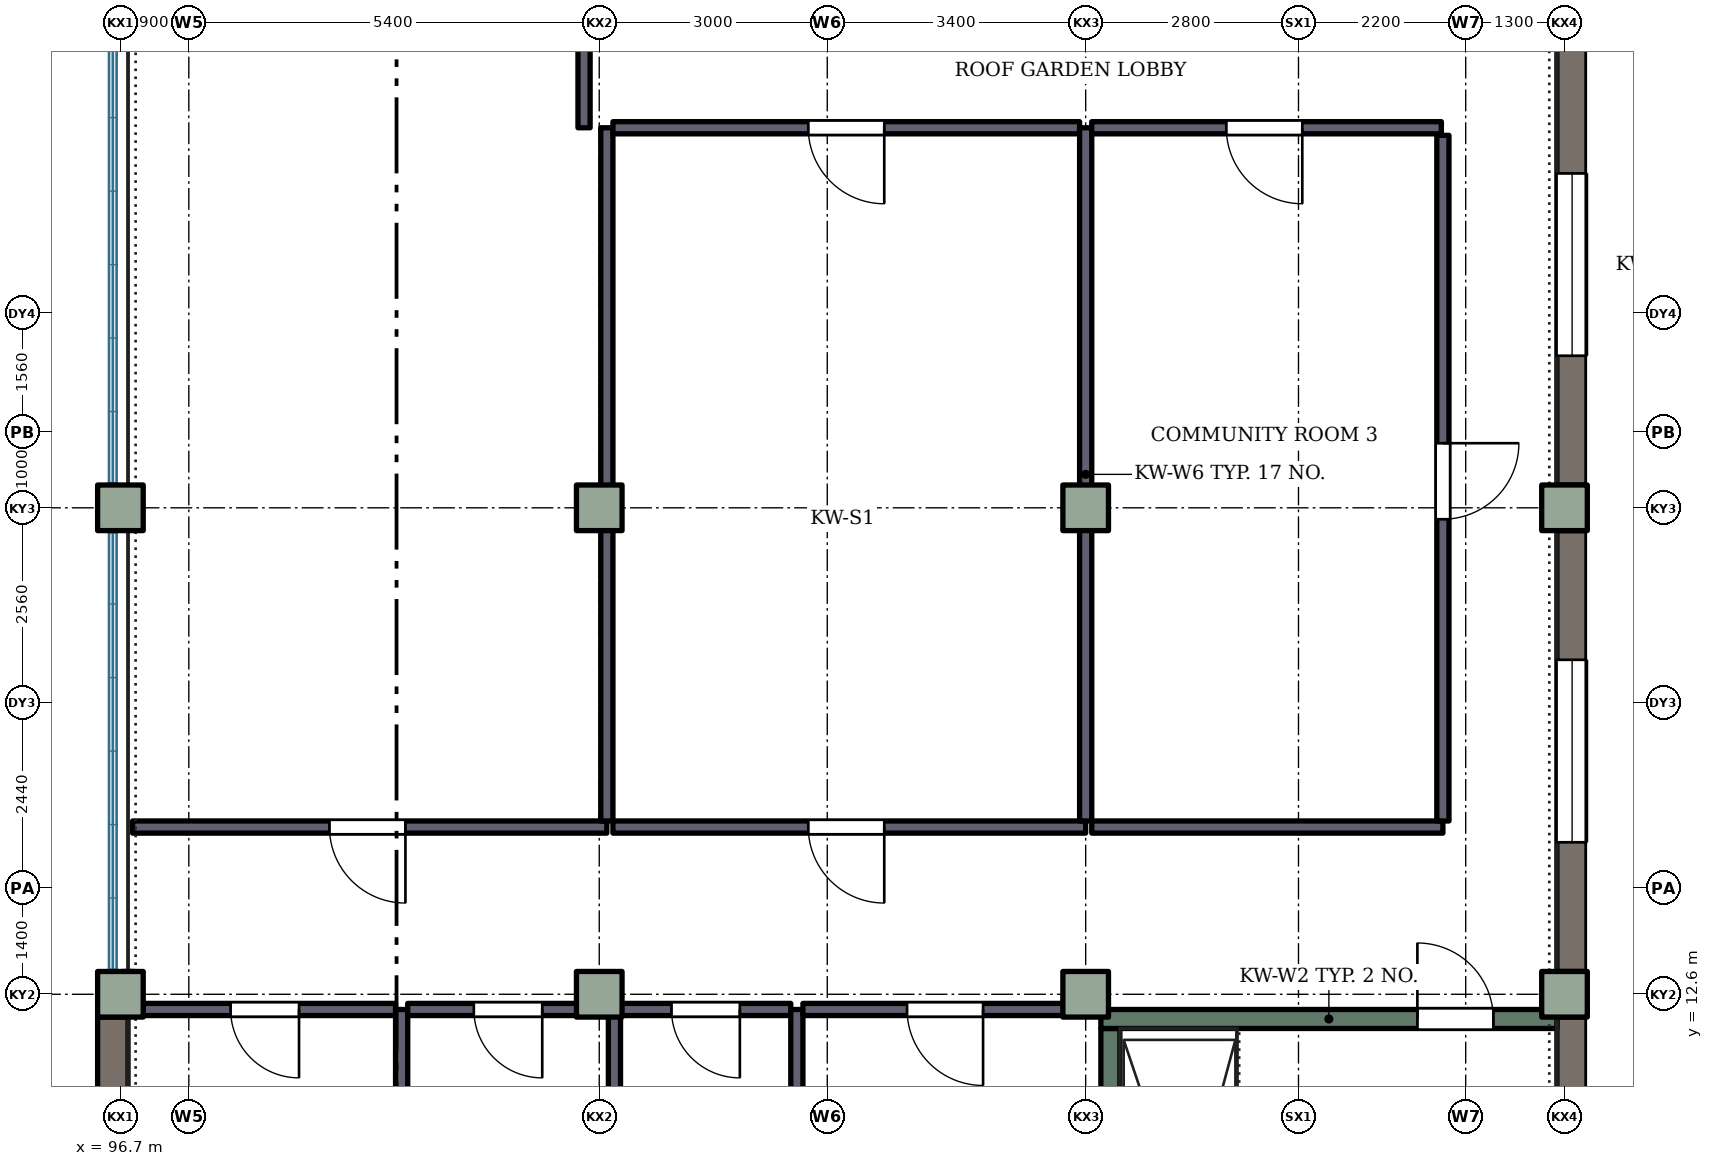
"""IFC4 building model, lengths in metres.
Left out: names, types, materials, properties, quantities, classifications, styles, units other than length and angle.
Written with IfcOpenShell. Run it as: python <this file> out.ifc"""

import sys

from ifc_helpers import new_model, si_unit, direction, frame, frame_2d, origin, origin_2d, place, context, subcontext, project, spatial, rectangle, extrude, element, fill, save


model = new_model("IFC4")
c1 = context("Model", 3, precision=1e-05, world=origin(), true_north=direction((0.0, 1.0)))
c2 = subcontext(c1, "Body", "Model", "MODEL_VIEW")
j1 = project(units=[si_unit("LENGTHUNIT", "METRE"), si_unit("PLANEANGLEUNIT", "RADIAN")], contexts=[c1])
p1 = place(None, origin())
s1 = spatial("IfcSite", under=j1, at=p1, CompositionType="ELEMENT")
p2 = place(p1, origin())
s2 = spatial("IfcBuilding", under=s1, at=p2, CompositionType="ELEMENT")
p3 = place(p2, frame((0.0, 0.0, 8.4)))
s3 = spatial("IfcBuildingStorey", under=s2, at=p3, CompositionType="ELEMENT", Elevation=8.4)
for number, where, z_axis, x_axis in (
    (1, (96.7, 12.6, 0.0), (0.0, 0.0, 1.0), (1.0, 0.0, 0.0)),
    (2, (96.7, 19.0, 0.0), (0.0, 0.0, 1.0), (1.0, 0.0, 0.0)),
    (3, (103.0, 12.6, 0.0), (0.0, 0.0, 1.0), (1.0, 0.0, 0.0)),
    (4, (103.0, 19.0, 0.0), (0.0, 0.0, 1.0), (1.0, 0.0, 0.0)),
    (5, (109.4, 12.6, 0.0), (0.0, 0.0, 1.0), (1.0, 0.0, 0.0)),
    (6, (109.4, 19.0, 0.0), (0.0, 0.0, 1.0), (1.0, 0.0, 0.0)),
    (7, (115.7, 12.6, 0.0), (0.0, 0.0, 1.0), (1.0, 0.0, 0.0)),
    (8, (115.7, 19.0, 0.0), (0.0, 0.0, 1.0), (1.0, 0.0, 0.0)),
):
    element("IfcColumn", number, at=place(p3, frame(where, z_axis=z_axis, x_axis=x_axis)), inside=s3, PredefinedType="COLUMN", context=c2, shape_type="SweptSolid", body=[
        extrude(rectangle(XDim=0.6, YDim=0.6, at=origin_2d()), origin(), (0.0, 0.0, 1.0), 4.2),
    ])
p4 = place(p3, frame((96.6, 6.6, 0.0), z_axis=(0.0, 0.0, 1.0), x_axis=(0.0, 1.0, 0.0)))
e9 = element("IfcWall", 9, at=p4, inside=s3, PredefinedType="SOLIDWALL", context=c2, shape_type="SweptSolid", body=[
    extrude(rectangle(XDim=5.7, YDim=0.4, at=frame_2d((2.85, 0.0))), origin(), (0.0, 0.0, 1.0), 4.2),
])
p5 = place(p3, frame((115.8, 12.3, 0.0), z_axis=(0.0, 0.0, 1.0), x_axis=(0.0, -1.0, 0.0)))
e10 = element("IfcWall", 10, at=p5, inside=s3, PredefinedType="SOLIDWALL", context=c2, shape_type="SweptSolid", body=[
    extrude(rectangle(XDim=5.7, YDim=0.4, at=frame_2d((2.85, 0.0))), origin(), (0.0, 0.0, 1.0), 4.2),
])
p6 = place(p5, frame((2.35, 0.0, 0.9)))
e11 = element("IfcOpeningElement", 11, at=p6, cuts=e10, PredefinedType="OPENING", context=c2, shape_type="SweptSolid", body=[
    extrude(rectangle(XDim=1.0, YDim=1.5, at=frame_2d((0.5, 0.75))), frame((0.0, 0.21, 0.0), z_axis=(0.0, -1.0, 0.0), x_axis=(1.0, 0.0, 0.0)), (0.0, 0.0, 1.0), 0.42),
])
p7 = place(p3, frame((115.8, 18.7, 0.0), z_axis=(0.0, 0.0, 1.0), x_axis=(0.0, -1.0, 0.0)))
e12 = element("IfcWall", 12, at=p7, inside=s3, PredefinedType="SOLIDWALL", context=c2, shape_type="SweptSolid", body=[
    extrude(rectangle(XDim=5.8, YDim=0.4, at=frame_2d((2.9, 0.0))), origin(), (0.0, 0.0, 1.0), 4.2),
])
p8 = place(p7, frame((1.7, 0.0, 0.9)))
e13 = element("IfcOpeningElement", 13, at=p8, cuts=e12, PredefinedType="OPENING", context=c2, shape_type="SweptSolid", body=[
    extrude(rectangle(XDim=2.4, YDim=2.7, at=frame_2d((1.2, 1.35))), frame((0.0, 0.21, 0.0), z_axis=(0.0, -1.0, 0.0), x_axis=(1.0, 0.0, 0.0)), (0.0, 0.0, 1.0), 0.42),
])
p9 = place(p3, frame((115.8, 25.1, 0.0), z_axis=(0.0, 0.0, 1.0), x_axis=(0.0, -1.0, 0.0)))
e14 = element("IfcWall", 14, at=p9, inside=s3, PredefinedType="SOLIDWALL", context=c2, shape_type="SweptSolid", body=[
    extrude(rectangle(XDim=5.8, YDim=0.4, at=frame_2d((2.9, 0.0))), origin(), (0.0, 0.0, 1.0), 4.2),
])
p10 = place(p9, frame((1.7, 0.0, 0.9)))
e15 = element("IfcOpeningElement", 15, at=p10, cuts=e14, PredefinedType="OPENING", context=c2, shape_type="SweptSolid", body=[
    extrude(rectangle(XDim=2.4, YDim=2.7, at=frame_2d((1.2, 1.35))), frame((0.0, 0.21, 0.0), z_axis=(0.0, -1.0, 0.0), x_axis=(1.0, 0.0, 0.0)), (0.0, 0.0, 1.0), 0.42),
])
p11 = place(p3, frame((109.725, 6.4, 0.0), z_axis=(0.0, 0.0, 1.0), x_axis=(0.0, 1.0, 0.0)))
e16 = element("IfcWall", 16, at=p11, inside=s3, PredefinedType="SHEAR", context=c2, shape_type="SweptSolid", body=[
    extrude(rectangle(XDim=5.75, YDim=0.25, at=frame_2d((2.875, 0.0))), origin(), (0.0, 0.0, 1.0), 4.2),
])
p12 = place(p3, frame((109.6, 12.275, 0.0), z_axis=(0.0, 0.0, 1.0), x_axis=(1.0, 0.0, 0.0)))
e17 = element("IfcWall", 17, at=p12, inside=s3, PredefinedType="SHEAR", context=c2, shape_type="SweptSolid", body=[
    extrude(rectangle(XDim=6.0, YDim=0.25, at=frame_2d((3.0, 0.0))), origin(), (0.0, 0.0, 1.0), 4.2),
])
p13 = place(p12, frame((4.164, 0.0, 0.0)))
e18 = element("IfcOpeningElement", 18, at=p13, cuts=e17, PredefinedType="OPENING", context=c2, shape_type="SweptSolid", body=[
    extrude(rectangle(XDim=1.0, YDim=2.1, at=frame_2d((0.5, 1.05))), frame((0.0, 0.135, 0.0), z_axis=(0.0, -1.0, 0.0), x_axis=(1.0, 0.0, 0.0)), (0.0, 0.0, 1.0), 0.27),
])
p14 = place(p3, frame((96.8, 12.9, 0.0), z_axis=(0.0, 0.0, 1.0), x_axis=(0.0, -1.0, 0.0)))
e19 = element("IfcWall", 19, at=p14, inside=s3, PredefinedType="PARTITIONING", context=c2, shape_type="SweptSolid", body=[
    extrude(rectangle(XDim=0.5, YDim=0.16, at=frame_2d((0.25, 0.0))), origin(), (0.0, 0.0, 1.0), 3.9),
])
p15 = place(p3, frame((100.32, 12.4, 0.0), z_axis=(0.0, 0.0, 1.0), x_axis=(-1.0, 0.0, 0.0)))
e20 = element("IfcWall", 20, at=p15, inside=s3, PredefinedType="PARTITIONING", context=c2, shape_type="SweptSolid", body=[
    extrude(rectangle(XDim=3.44, YDim=0.16, at=frame_2d((1.72, 0.0))), origin(), (0.0, 0.0, 1.0), 3.9),
])
p16 = place(p15, frame((1.27, 0.0, 0.0)))
e21 = element("IfcOpeningElement", 21, at=p16, cuts=e20, PredefinedType="OPENING", context=c2, shape_type="SweptSolid", body=[
    extrude(rectangle(XDim=0.9, YDim=2.1, at=frame_2d((0.45, 1.05))), frame((0.0, 0.09, 0.0), z_axis=(0.0, -1.0, 0.0), x_axis=(1.0, 0.0, 0.0)), (0.0, 0.0, 1.0), 0.18),
])
p17 = place(p3, frame((100.4, 6.48, 0.0), z_axis=(0.0, 0.0, 1.0), x_axis=(0.0, 1.0, 0.0)))
e22 = element("IfcWall", 22, at=p17, inside=s3, PredefinedType="PARTITIONING", context=c2, shape_type="SweptSolid", body=[
    extrude(rectangle(XDim=5.92, YDim=0.16, at=frame_2d((2.96, 0.0))), origin(), (0.0, 0.0, 1.0), 3.9),
])
p18 = place(p3, frame((102.8, 24.0, 0.0), z_axis=(0.0, 0.0, 1.0), x_axis=(0.0, 1.0, 0.0)))
e23 = element("IfcWall", 23, at=p18, inside=s3, PredefinedType="PARTITIONING", context=c2, shape_type="SweptSolid", body=[
    extrude(rectangle(XDim=1.32, YDim=0.16, at=frame_2d((0.66, 0.0))), origin(), (0.0, 0.0, 1.0), 3.9),
])
p19 = place(p3, frame((103.1, 14.8, 0.0), z_axis=(0.0, 0.0, 1.0), x_axis=(-1.0, 0.0, 0.0)))
e24 = element("IfcWall", 24, at=p19, inside=s3, PredefinedType="PARTITIONING", context=c2, shape_type="SweptSolid", body=[
    extrude(rectangle(XDim=6.24, YDim=0.16, at=frame_2d((3.12, 0.0))), origin(), (0.0, 0.0, 1.0), 3.9),
])
p20 = place(p19, frame((2.65, 0.0, 0.0)))
e25 = element("IfcOpeningElement", 25, at=p20, cuts=e24, PredefinedType="OPENING", context=c2, shape_type="SweptSolid", body=[
    extrude(rectangle(XDim=1.0, YDim=2.1, at=frame_2d((0.5, 1.05))), frame((0.0, 0.09, 0.0), z_axis=(0.0, -1.0, 0.0), x_axis=(1.0, 0.0, 0.0)), (0.0, 0.0, 1.0), 0.18),
])
p21 = place(p3, frame((103.1, 14.88, 0.0), z_axis=(0.0, 0.0, 1.0), x_axis=(0.0, 1.0, 0.0)))
e26 = element("IfcWall", 26, at=p21, inside=s3, PredefinedType="PARTITIONING", context=c2, shape_type="SweptSolid", body=[
    extrude(rectangle(XDim=9.12, YDim=0.16, at=frame_2d((4.56, 0.0))), origin(), (0.0, 0.0, 1.0), 3.9),
])
p22 = place(p3, frame((103.12, 12.4, 0.0), z_axis=(0.0, 0.0, 1.0), x_axis=(-1.0, 0.0, 0.0)))
e27 = element("IfcWall", 27, at=p22, inside=s3, PredefinedType="PARTITIONING", context=c2, shape_type="SweptSolid", body=[
    extrude(rectangle(XDim=2.64, YDim=0.16, at=frame_2d((1.32, 0.0))), origin(), (0.0, 0.0, 1.0), 3.9),
])
p23 = place(p22, frame((0.87, 0.0, 0.0)))
e28 = element("IfcOpeningElement", 28, at=p23, cuts=e27, PredefinedType="OPENING", context=c2, shape_type="SweptSolid", body=[
    extrude(rectangle(XDim=0.9, YDim=2.1, at=frame_2d((0.45, 1.05))), frame((0.0, 0.09, 0.0), z_axis=(0.0, -1.0, 0.0), x_axis=(1.0, 0.0, 0.0)), (0.0, 0.0, 1.0), 0.18),
])
p24 = place(p3, frame((103.2, 6.48, 0.0), z_axis=(0.0, 0.0, 1.0), x_axis=(0.0, 1.0, 0.0)))
e29 = element("IfcWall", 29, at=p24, inside=s3, PredefinedType="PARTITIONING", context=c2, shape_type="SweptSolid", body=[
    extrude(rectangle(XDim=5.92, YDim=0.16, at=frame_2d((2.96, 0.0))), origin(), (0.0, 0.0, 1.0), 3.9),
])
p25 = place(p3, frame((105.52, 12.4, 0.0), z_axis=(0.0, 0.0, 1.0), x_axis=(-1.0, 0.0, 0.0)))
e30 = element("IfcWall", 30, at=p25, inside=s3, PredefinedType="PARTITIONING", context=c2, shape_type="SweptSolid", body=[
    extrude(rectangle(XDim=2.24, YDim=0.16, at=frame_2d((1.12, 0.0))), origin(), (0.0, 0.0, 1.0), 3.9),
])
p26 = place(p25, frame((0.67, 0.0, 0.0)))
e31 = element("IfcOpeningElement", 31, at=p26, cuts=e30, PredefinedType="OPENING", context=c2, shape_type="SweptSolid", body=[
    extrude(rectangle(XDim=0.9, YDim=2.1, at=frame_2d((0.45, 1.05))), frame((0.0, 0.09, 0.0), z_axis=(0.0, -1.0, 0.0), x_axis=(1.0, 0.0, 0.0)), (0.0, 0.0, 1.0), 0.18),
])
p27 = place(p3, frame((105.6, 6.48, 0.0), z_axis=(0.0, 0.0, 1.0), x_axis=(0.0, 1.0, 0.0)))
e32 = element("IfcWall", 32, at=p27, inside=s3, PredefinedType="PARTITIONING", context=c2, shape_type="SweptSolid", body=[
    extrude(rectangle(XDim=5.92, YDim=0.16, at=frame_2d((2.96, 0.0))), origin(), (0.0, 0.0, 1.0), 3.9),
])
p28 = place(p3, frame((109.32, 24.0, 0.0), z_axis=(0.0, 0.0, 1.0), x_axis=(-1.0, 0.0, 0.0)))
e33 = element("IfcWall", 33, at=p28, inside=s3, PredefinedType="PARTITIONING", context=c2, shape_type="SweptSolid", body=[
    extrude(rectangle(XDim=6.14, YDim=0.16, at=frame_2d((3.07, 0.0))), origin(), (0.0, 0.0, 1.0), 3.9),
])
p29 = place(p28, frame((2.57, 0.0, 0.0)))
e34 = element("IfcOpeningElement", 34, at=p29, cuts=e33, PredefinedType="OPENING", context=c2, shape_type="SweptSolid", body=[
    extrude(rectangle(XDim=1.0, YDim=2.1, at=frame_2d((0.5, 1.05))), frame((0.0, 0.09, 0.0), z_axis=(0.0, -1.0, 0.0), x_axis=(1.0, 0.0, 0.0)), (0.0, 0.0, 1.0), 0.18),
])
p30 = place(p3, frame((109.4, 14.8, 0.0), z_axis=(0.0, 0.0, 1.0), x_axis=(-1.0, 0.0, 0.0)))
e35 = element("IfcWall", 35, at=p30, inside=s3, PredefinedType="PARTITIONING", context=c2, shape_type="SweptSolid", body=[
    extrude(rectangle(XDim=6.22, YDim=0.16, at=frame_2d((3.11, 0.0))), origin(), (0.0, 0.0, 1.0), 3.9),
])
p31 = place(p30, frame((2.65, 0.0, 0.0)))
e36 = element("IfcOpeningElement", 36, at=p31, cuts=e35, PredefinedType="OPENING", context=c2, shape_type="SweptSolid", body=[
    extrude(rectangle(XDim=1.0, YDim=2.1, at=frame_2d((0.5, 1.05))), frame((0.0, 0.09, 0.0), z_axis=(0.0, -1.0, 0.0), x_axis=(1.0, 0.0, 0.0)), (0.0, 0.0, 1.0), 0.18),
])
p32 = place(p3, frame((109.4, 14.88, 0.0), z_axis=(0.0, 0.0, 1.0), x_axis=(0.0, 1.0, 0.0)))
e37 = element("IfcWall", 37, at=p32, inside=s3, PredefinedType="PARTITIONING", context=c2, shape_type="SweptSolid", body=[
    extrude(rectangle(XDim=9.12, YDim=0.16, at=frame_2d((4.56, 0.0))), origin(), (0.0, 0.0, 1.0), 3.9),
])
p33 = place(p3, frame((109.52, 12.4, 0.0), z_axis=(0.0, 0.0, 1.0), x_axis=(-1.0, 0.0, 0.0)))
e38 = element("IfcWall", 38, at=p33, inside=s3, PredefinedType="PARTITIONING", context=c2, shape_type="SweptSolid", body=[
    extrude(rectangle(XDim=3.84, YDim=0.16, at=frame_2d((1.92, 0.0))), origin(), (0.0, 0.0, 1.0), 3.9),
])
p34 = place(p33, frame((1.47, 0.0, 0.0)))
e39 = element("IfcOpeningElement", 39, at=p34, cuts=e38, PredefinedType="OPENING", context=c2, shape_type="SweptSolid", body=[
    extrude(rectangle(XDim=1.0, YDim=2.1, at=frame_2d((0.5, 1.05))), frame((0.0, 0.09, 0.0), z_axis=(0.0, -1.0, 0.0), x_axis=(1.0, 0.0, 0.0)), (0.0, 0.0, 1.0), 0.18),
])
p35 = place(p3, frame((114.08, 24.0, 0.0), z_axis=(0.0, 0.0, 1.0), x_axis=(-1.0, 0.0, 0.0)))
e40 = element("IfcWall", 40, at=p35, inside=s3, PredefinedType="PARTITIONING", context=c2, shape_type="SweptSolid", body=[
    extrude(rectangle(XDim=4.6, YDim=0.16, at=frame_2d((2.3, 0.0))), origin(), (0.0, 0.0, 1.0), 3.9),
])
p36 = place(p35, frame((1.83, 0.0, 0.0)))
e41 = element("IfcOpeningElement", 41, at=p36, cuts=e40, PredefinedType="OPENING", context=c2, shape_type="SweptSolid", body=[
    extrude(rectangle(XDim=1.0, YDim=2.1, at=frame_2d((0.5, 1.05))), frame((0.0, 0.09, 0.0), z_axis=(0.0, -1.0, 0.0), x_axis=(1.0, 0.0, 0.0)), (0.0, 0.0, 1.0), 0.18),
])
p37 = place(p3, frame((114.1, 14.8, 0.0), z_axis=(0.0, 0.0, 1.0), x_axis=(-1.0, 0.0, 0.0)))
e42 = element("IfcWall", 42, at=p37, inside=s3, PredefinedType="PARTITIONING", context=c2, shape_type="SweptSolid", body=[
    extrude(rectangle(XDim=4.62, YDim=0.16, at=frame_2d((2.31, 0.0))), origin(), (0.0, 0.0, 1.0), 3.9),
])
p38 = place(p3, frame((114.1, 23.9, 0.0), z_axis=(0.0, 0.0, 1.0), x_axis=(0.0, -1.0, 0.0)))
e43 = element("IfcWall", 43, at=p38, inside=s3, PredefinedType="PARTITIONING", context=c2, shape_type="SweptSolid", body=[
    extrude(rectangle(XDim=9.02, YDim=0.16, at=frame_2d((4.51, 0.0))), origin(), (0.0, 0.0, 1.0), 3.9),
])
p39 = place(p38, frame((4.05, 0.0, 0.0)))
e44 = element("IfcOpeningElement", 44, at=p39, cuts=e43, PredefinedType="OPENING", context=c2, shape_type="SweptSolid", body=[
    extrude(rectangle(XDim=1.0, YDim=2.1, at=frame_2d((0.5, 1.05))), frame((0.0, 0.09, 0.0), z_axis=(0.0, -1.0, 0.0), x_axis=(1.0, 0.0, 0.0)), (0.0, 0.0, 1.0), 0.18),
])
p40 = place(p3, frame((115.6, 12.48, 0.0), z_axis=(0.0, 0.0, 1.0), x_axis=(0.0, 1.0, 0.0)))
e45 = element("IfcWall", 45, at=p40, inside=s3, PredefinedType="PARTITIONING", context=c2, shape_type="SweptSolid", body=[
    extrude(rectangle(XDim=0.34, YDim=0.16, at=frame_2d((0.17, 0.0))), origin(), (0.0, 0.0, 1.0), 3.9),
])
p41 = place(p3, frame((115.6, 18.78, 0.0), z_axis=(0.0, 0.0, 1.0), x_axis=(0.0, 1.0, 0.0)))
e46 = element("IfcWall", 46, at=p41, inside=s3, PredefinedType="PARTITIONING", context=c2, shape_type="SweptSolid", body=[
    extrude(rectangle(XDim=0.44, YDim=0.16, at=frame_2d((0.22, 0.0))), origin(), (0.0, 0.0, 1.0), 3.9),
])
p42 = place(p8, origin())
e47 = element("IfcWindow", 47, at=p42, inside=s3, PartitioningType="SINGLE_PANEL", PredefinedType="WINDOW", context=c2, shape_type="SweptSolid", body=[
    extrude(rectangle(XDim=2.4, YDim=2.7, at=frame_2d((1.2, 1.35))), frame((0.0, 0.03, 0.0), z_axis=(0.0, -1.0, 0.0), x_axis=(1.0, 0.0, 0.0)), (0.0, 0.0, 1.0), 0.06),
])
fill(e13, e47)
p43 = place(p10, origin())
e48 = element("IfcWindow", 48, at=p43, inside=s3, PartitioningType="SINGLE_PANEL", PredefinedType="WINDOW", context=c2, shape_type="SweptSolid", body=[
    extrude(rectangle(XDim=2.4, YDim=2.7, at=frame_2d((1.2, 1.35))), frame((0.0, 0.03, 0.0), z_axis=(0.0, -1.0, 0.0), x_axis=(1.0, 0.0, 0.0)), (0.0, 0.0, 1.0), 0.06),
])
fill(e15, e48)
p44 = place(p16, origin())
e49 = element("IfcDoor", 49, at=p44, inside=s3, OperationType="SINGLE_SWING_LEFT", PredefinedType="DOOR", context=c2, shape_type="SweptSolid", body=[
    extrude(rectangle(XDim=0.9, YDim=2.1, at=frame_2d((0.45, 1.05))), frame((0.0, 0.025, 0.0), z_axis=(0.0, -1.0, 0.0), x_axis=(1.0, 0.0, 0.0)), (0.0, 0.0, 1.0), 0.05),
])
fill(e21, e49)
p45 = place(p23, origin())
e50 = element("IfcDoor", 50, at=p45, inside=s3, OperationType="SINGLE_SWING_LEFT", PredefinedType="DOOR", context=c2, shape_type="SweptSolid", body=[
    extrude(rectangle(XDim=0.9, YDim=2.1, at=frame_2d((0.45, 1.05))), frame((0.0, 0.025, 0.0), z_axis=(0.0, -1.0, 0.0), x_axis=(1.0, 0.0, 0.0)), (0.0, 0.0, 1.0), 0.05),
])
fill(e28, e50)
p46 = place(p26, origin())
e51 = element("IfcDoor", 51, at=p46, inside=s3, OperationType="SINGLE_SWING_LEFT", PredefinedType="DOOR", context=c2, shape_type="SweptSolid", body=[
    extrude(rectangle(XDim=0.9, YDim=2.1, at=frame_2d((0.45, 1.05))), frame((0.0, 0.025, 0.0), z_axis=(0.0, -1.0, 0.0), x_axis=(1.0, 0.0, 0.0)), (0.0, 0.0, 1.0), 0.05),
])
fill(e31, e51)
p47 = place(p34, origin())
e52 = element("IfcDoor", 52, at=p47, inside=s3, OperationType="SINGLE_SWING_LEFT", PredefinedType="DOOR", context=c2, shape_type="SweptSolid", body=[
    extrude(rectangle(XDim=1.0, YDim=2.1, at=frame_2d((0.5, 1.05))), frame((0.0, 0.025, 0.0), z_axis=(0.0, -1.0, 0.0), x_axis=(1.0, 0.0, 0.0)), (0.0, 0.0, 1.0), 0.05),
])
fill(e39, e52)
p48 = place(p13, origin())
e53 = element("IfcDoor", 53, at=p48, inside=s3, OperationType="SINGLE_SWING_LEFT", PredefinedType="DOOR", context=c2, shape_type="SweptSolid", body=[
    extrude(rectangle(XDim=1.0, YDim=2.1, at=frame_2d((0.5, 1.05))), frame((0.0, 0.025, 0.0), z_axis=(0.0, -1.0, 0.0), x_axis=(1.0, 0.0, 0.0)), (0.0, 0.0, 1.0), 0.05),
])
fill(e18, e53)
p49 = place(p20, origin())
e54 = element("IfcDoor", 54, at=p49, inside=s3, OperationType="SINGLE_SWING_LEFT", PredefinedType="DOOR", context=c2, shape_type="SweptSolid", body=[
    extrude(rectangle(XDim=1.0, YDim=2.1, at=frame_2d((0.5, 1.05))), frame((0.0, 0.025, 0.0), z_axis=(0.0, -1.0, 0.0), x_axis=(1.0, 0.0, 0.0)), (0.0, 0.0, 1.0), 0.05),
])
fill(e25, e54)
p50 = place(p31, origin())
e55 = element("IfcDoor", 55, at=p50, inside=s3, OperationType="SINGLE_SWING_LEFT", PredefinedType="DOOR", context=c2, shape_type="SweptSolid", body=[
    extrude(rectangle(XDim=1.0, YDim=2.1, at=frame_2d((0.5, 1.05))), frame((0.0, 0.025, 0.0), z_axis=(0.0, -1.0, 0.0), x_axis=(1.0, 0.0, 0.0)), (0.0, 0.0, 1.0), 0.05),
])
fill(e36, e55)
p51 = place(p29, origin())
e56 = element("IfcDoor", 56, at=p51, inside=s3, OperationType="SINGLE_SWING_LEFT", PredefinedType="DOOR", context=c2, shape_type="SweptSolid", body=[
    extrude(rectangle(XDim=1.0, YDim=2.1, at=frame_2d((0.5, 1.05))), frame((0.0, 0.025, 0.0), z_axis=(0.0, -1.0, 0.0), x_axis=(1.0, 0.0, 0.0)), (0.0, 0.0, 1.0), 0.05),
])
fill(e34, e56)
p52 = place(p39, origin())
e57 = element("IfcDoor", 57, at=p52, inside=s3, OperationType="SINGLE_SWING_LEFT", PredefinedType="DOOR", context=c2, shape_type="SweptSolid", body=[
    extrude(rectangle(XDim=1.0, YDim=2.1, at=frame_2d((0.5, 1.05))), frame((0.0, 0.025, 0.0), z_axis=(0.0, -1.0, 0.0), x_axis=(1.0, 0.0, 0.0)), (0.0, 0.0, 1.0), 0.05),
])
fill(e44, e57)
p53 = place(p36, origin())
e58 = element("IfcDoor", 58, at=p53, inside=s3, OperationType="SINGLE_SWING_LEFT", PredefinedType="DOOR", context=c2, shape_type="SweptSolid", body=[
    extrude(rectangle(XDim=1.0, YDim=2.1, at=frame_2d((0.5, 1.05))), frame((0.0, 0.025, 0.0), z_axis=(0.0, -1.0, 0.0), x_axis=(1.0, 0.0, 0.0)), (0.0, 0.0, 1.0), 0.05),
])
fill(e41, e58)
save(model, sys.argv[1])
